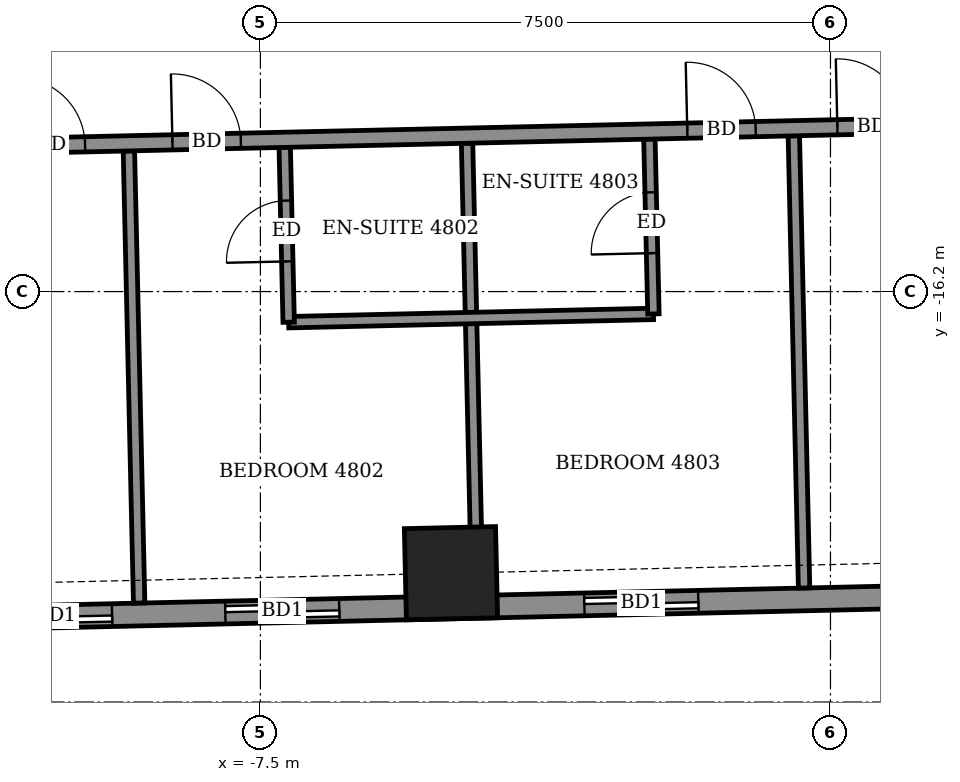
"""IFC4 building model, lengths in metres.
Left out: names, types, materials, properties, quantities, classifications, styles, units other than length and angle.
Written with IfcOpenShell. Run it as: python <this file> out.ifc"""

import sys

from ifc_helpers import new_model, si_unit, direction, frame, frame_2d, origin, origin_2d, place, context, subcontext, project, spatial, rectangle, extrude, element, fill, save


model = new_model("IFC4")
c1 = context("Model", 3, precision=1e-05, world=origin(), true_north=direction((0.0, 1.0)))
c2 = subcontext(c1, "Body", "Model", "MODEL_VIEW")
j1 = project(units=[si_unit("LENGTHUNIT", "METRE"), si_unit("PLANEANGLEUNIT", "RADIAN")], contexts=[c1])
p1 = place(None, origin())
s1 = spatial("IfcSite", under=j1, at=p1, CompositionType="ELEMENT")
p2 = place(p1, origin())
s2 = spatial("IfcBuilding", under=s1, at=p2, CompositionType="ELEMENT")
p3 = place(p2, frame((0.0, 0.0, 189.7)))
s3 = spatial("IfcBuildingStorey", under=s2, at=p3, CompositionType="ELEMENT", Elevation=189.7)
p4 = place(p3, frame((-4.993, -19.905, -0.55), z_axis=(0.0, 0.0, 1.0), x_axis=(0.999741061935, 0.022755418739, 0.0)))
e1 = element("IfcColumn", 1, at=p4, inside=s3, PredefinedType="COLUMN", context=c2, shape_type="SweptSolid", body=[
    extrude(rectangle(XDim=1.2, YDim=1.2, at=origin_2d()), origin(), (0.0, 0.0, 1.0), 3.6),
])
p5 = place(p3, frame((-18.189, -20.655, 0.0), z_axis=(0.0, 0.0, 1.0), x_axis=(0.999742285265, 0.022701609063, 0.0)))
e2 = element("IfcWall", 2, at=p5, inside=s3, PredefinedType="SOLIDWALL", context=c2, shape_type="SweptSolid", body=[
    extrude(rectangle(XDim=39.78, YDim=0.3, at=frame_2d((19.89, 0.0))), origin(), (0.0, 0.0, 1.0), 3.05),
])
p6 = place(p5, frame((1.948, 0.0, 0.0)))
e3 = element("IfcOpeningElement", 3, at=p6, cuts=e2, PredefinedType="OPENING", context=c2, shape_type="SweptSolid", body=[
    extrude(rectangle(XDim=1.5, YDim=2.4, at=frame_2d((0.75, 1.2))), frame((0.0, 0.16, 0.0), z_axis=(0.0, -1.0, 0.0), x_axis=(1.0, 0.0, 0.0)), (0.0, 0.0, 1.0), 0.32),
])
p7 = place(p5, frame((7.24, 0.0, 0.0)))
e4 = element("IfcOpeningElement", 4, at=p7, cuts=e2, PredefinedType="OPENING", context=c2, shape_type="SweptSolid", body=[
    extrude(rectangle(XDim=1.5, YDim=2.4, at=frame_2d((0.75, 1.2))), frame((0.0, 0.16, 0.0), z_axis=(0.0, -1.0, 0.0), x_axis=(1.0, 0.0, 0.0)), (0.0, 0.0, 1.0), 0.32),
])
p8 = place(p5, frame((10.23, 0.0, 0.0)))
e5 = element("IfcOpeningElement", 5, at=p8, cuts=e2, PredefinedType="OPENING", context=c2, shape_type="SweptSolid", body=[
    extrude(rectangle(XDim=1.5, YDim=2.4, at=frame_2d((0.75, 1.2))), frame((0.0, 0.16, 0.0), z_axis=(0.0, -1.0, 0.0), x_axis=(1.0, 0.0, 0.0)), (0.0, 0.0, 1.0), 0.32),
])
p9 = place(p5, frame((14.955, 0.0, 0.0)))
e6 = element("IfcOpeningElement", 6, at=p9, cuts=e2, PredefinedType="OPENING", context=c2, shape_type="SweptSolid", body=[
    extrude(rectangle(XDim=1.5, YDim=2.4, at=frame_2d((0.75, 1.2))), frame((0.0, 0.16, 0.0), z_axis=(0.0, -1.0, 0.0), x_axis=(1.0, 0.0, 0.0)), (0.0, 0.0, 1.0), 0.32),
])
p10 = place(p5, frame((20.67, 0.0, 0.0)))
e7 = element("IfcOpeningElement", 7, at=p10, cuts=e2, PredefinedType="OPENING", context=c2, shape_type="SweptSolid", body=[
    extrude(rectangle(XDim=1.2, YDim=2.4, at=frame_2d((0.6, 1.2))), frame((0.0, 0.16, 0.0), z_axis=(0.0, -1.0, 0.0), x_axis=(1.0, 0.0, 0.0)), (0.0, 0.0, 1.0), 0.32),
])
p11 = place(p5, frame((23.51, 0.0, 0.0)))
e8 = element("IfcOpeningElement", 8, at=p11, cuts=e2, PredefinedType="OPENING", context=c2, shape_type="SweptSolid", body=[
    extrude(rectangle(XDim=1.5, YDim=2.4, at=frame_2d((0.75, 1.2))), frame((0.0, 0.16, 0.0), z_axis=(0.0, -1.0, 0.0), x_axis=(1.0, 0.0, 0.0)), (0.0, 0.0, 1.0), 0.32),
])
p12 = place(p5, frame((28.21, 0.0, 0.0)))
e9 = element("IfcOpeningElement", 9, at=p12, cuts=e2, PredefinedType="OPENING", context=c2, shape_type="SweptSolid", body=[
    extrude(rectangle(XDim=1.5, YDim=2.4, at=frame_2d((0.75, 1.2))), frame((0.0, 0.16, 0.0), z_axis=(0.0, -1.0, 0.0), x_axis=(1.0, 0.0, 0.0)), (0.0, 0.0, 1.0), 0.32),
])
p13 = place(p5, frame((31.35, 0.0, 0.0)))
e10 = element("IfcOpeningElement", 10, at=p13, cuts=e2, PredefinedType="OPENING", context=c2, shape_type="SweptSolid", body=[
    extrude(rectangle(XDim=1.2, YDim=2.4, at=frame_2d((0.6, 1.2))), frame((0.0, 0.16, 0.0), z_axis=(0.0, -1.0, 0.0), x_axis=(1.0, 0.0, 0.0)), (0.0, 0.0, 1.0), 0.32),
])
p14 = place(p5, frame((35.94, 0.0, 0.9)))
e11 = element("IfcOpeningElement", 11, at=p14, cuts=e2, PredefinedType="OPENING", context=c2, shape_type="SweptSolid", body=[
    extrude(rectangle(XDim=2.4, YDim=1.5, at=frame_2d((1.2, 0.75))), frame((0.0, 0.16, 0.0), z_axis=(0.0, -1.0, 0.0), x_axis=(1.0, 0.0, 0.0)), (0.0, 0.0, 1.0), 0.32),
])
p15 = place(p3, frame((-9.095, -20.298, 0.0), z_axis=(0.0, 0.0, 1.0), x_axis=(-0.022692509051, 0.999742491861, 0.0)))
e12 = element("IfcWall", 12, at=p15, inside=s3, PredefinedType="PARTITIONING", context=c2, shape_type="SweptSolid", body=[
    extrude(rectangle(XDim=5.949, YDim=0.15, at=frame_2d((2.975, 0.0))), origin(), (0.0, 0.0, 1.0), 2.55),
])
p16 = place(p3, frame((-4.646, -20.197, 0.0), z_axis=(0.0, 0.0, 1.0), x_axis=(-0.022692509051, 0.999742491861, 0.0)))
e13 = element("IfcWall", 13, at=p16, inside=s3, PredefinedType="PARTITIONING", context=c2, shape_type="SweptSolid", body=[
    extrude(rectangle(XDim=5.949, YDim=0.15, at=frame_2d((2.975, 0.0))), origin(), (0.0, 0.0, 1.0), 3.05),
])
p17 = place(p3, frame((-0.347, -20.1, 0.0), z_axis=(0.0, 0.0, 1.0), x_axis=(-0.022687855237, 0.999742597484, 0.0)))
e14 = element("IfcWall", 14, at=p17, inside=s3, PredefinedType="PARTITIONING", context=c2, shape_type="SweptSolid", body=[
    extrude(rectangle(XDim=5.951, YDim=0.15, at=frame_2d((2.975, 0.0))), origin(), (0.0, 0.0, 1.0), 2.55),
])
p18 = place(p3, frame((-7.128, -16.603, 0.0), z_axis=(0.0, 0.0, 1.0), x_axis=(0.999741520352, 0.022735269617, 0.0)))
e15 = element("IfcWall", 15, at=p18, inside=s3, PredefinedType="PARTITIONING", context=c2, shape_type="SweptSolid", body=[
    extrude(rectangle(XDim=4.8, YDim=0.15, at=frame_2d((2.4, 0.0))), origin(), (0.0, 0.0, 1.0), 3.05),
])
p19 = place(p3, frame((-7.128, -16.603, 0.0), z_axis=(0.0, 0.0, 1.0), x_axis=(-0.022603288534, 0.999744513037, 0.0)))
e16 = element("IfcWall", 16, at=p19, inside=s3, PredefinedType="PARTITIONING", context=c2, shape_type="SweptSolid", body=[
    extrude(rectangle(XDim=2.301, YDim=0.15, at=frame_2d((1.15, 0.0))), origin(), (0.0, 0.0, 1.0), 3.05),
])
p20 = place(p19, frame((0.8, 0.0, 0.0)))
e17 = element("IfcOpeningElement", 17, at=p20, cuts=e16, PredefinedType="OPENING", context=c2, shape_type="SweptSolid", body=[
    extrude(rectangle(XDim=0.8, YDim=2.1, at=frame_2d((0.4, 1.05))), frame((0.0, 0.085, 0.0), z_axis=(0.0, -1.0, 0.0), x_axis=(1.0, 0.0, 0.0)), (0.0, 0.0, 1.0), 0.17),
])
p21 = place(p3, frame((-2.329, -16.494, 0.0), z_axis=(0.0, 0.0, 1.0), x_axis=(-0.023029983665, 0.999734774754, 0.0)))
e18 = element("IfcWall", 18, at=p21, inside=s3, PredefinedType="PARTITIONING", context=c2, shape_type="SweptSolid", body=[
    extrude(rectangle(XDim=2.3, YDim=0.15, at=frame_2d((1.15, 0.0))), origin(), (0.0, 0.0, 1.0), 3.05),
])
p22 = place(p21, frame((0.8, 0.0, 0.0)))
e19 = element("IfcOpeningElement", 19, at=p22, cuts=e18, PredefinedType="OPENING", context=c2, shape_type="SweptSolid", body=[
    extrude(rectangle(XDim=0.8, YDim=2.1, at=frame_2d((0.4, 1.05))), frame((0.0, 0.085, 0.0), z_axis=(0.0, -1.0, 0.0), x_axis=(1.0, 0.0, 0.0)), (0.0, 0.0, 1.0), 0.17),
])
p23 = place(p3, frame((-21.279, -14.523, 0.0), z_axis=(0.0, 0.0, 1.0), x_axis=(0.999742878501, 0.022675468818, 0.0)))
e20 = element("IfcWall", 20, at=p23, inside=s3, PredefinedType="PARTITIONING", context=c2, shape_type="SweptSolid", body=[
    extrude(rectangle(XDim=46.48, YDim=0.2, at=frame_2d((23.24, 0.0))), origin(), (0.0, 0.0, 1.0), 3.05),
])
p24 = place(p23, frame((1.4, 0.0, 0.0)))
e21 = element("IfcOpeningElement", 21, at=p24, cuts=e20, PredefinedType="OPENING", context=c2, shape_type="SweptSolid", body=[
    extrude(rectangle(XDim=1.0, YDim=2.1, at=frame_2d((0.5, 1.05))), frame((0.0, 0.11, 0.0), z_axis=(0.0, -1.0, 0.0), x_axis=(1.0, 0.0, 0.0)), (0.0, 0.0, 1.0), 0.22),
])
p25 = place(p23, frame((5.95, 0.0, 0.0)))
e22 = element("IfcOpeningElement", 22, at=p25, cuts=e20, PredefinedType="OPENING", context=c2, shape_type="SweptSolid", body=[
    extrude(rectangle(XDim=0.9, YDim=2.1, at=frame_2d((0.45, 1.05))), frame((0.0, 0.11, 0.0), z_axis=(0.0, -1.0, 0.0), x_axis=(1.0, 0.0, 0.0)), (0.0, 0.0, 1.0), 0.22),
])
p26 = place(p23, frame((10.575, 0.0, 0.0)))
e23 = element("IfcOpeningElement", 23, at=p26, cuts=e20, PredefinedType="OPENING", context=c2, shape_type="SweptSolid", body=[
    extrude(rectangle(XDim=0.9, YDim=2.1, at=frame_2d((0.45, 1.05))), frame((0.0, 0.11, 0.0), z_axis=(0.0, -1.0, 0.0), x_axis=(1.0, 0.0, 0.0)), (0.0, 0.0, 1.0), 0.22),
])
p27 = place(p23, frame((12.625, 0.0, 0.0)))
e24 = element("IfcOpeningElement", 24, at=p27, cuts=e20, PredefinedType="OPENING", context=c2, shape_type="SweptSolid", body=[
    extrude(rectangle(XDim=0.9, YDim=2.1, at=frame_2d((0.45, 1.05))), frame((0.0, 0.11, 0.0), z_axis=(0.0, -1.0, 0.0), x_axis=(1.0, 0.0, 0.0)), (0.0, 0.0, 1.0), 0.22),
])
p28 = place(p23, frame((19.4, 0.0, 0.0)))
e25 = element("IfcOpeningElement", 25, at=p28, cuts=e20, PredefinedType="OPENING", context=c2, shape_type="SweptSolid", body=[
    extrude(rectangle(XDim=0.9, YDim=2.1, at=frame_2d((0.45, 1.05))), frame((0.0, 0.11, 0.0), z_axis=(0.0, -1.0, 0.0), x_axis=(1.0, 0.0, 0.0)), (0.0, 0.0, 1.0), 0.22),
])
p29 = place(p23, frame((21.375, 0.0, 0.0)))
e26 = element("IfcOpeningElement", 26, at=p29, cuts=e20, PredefinedType="OPENING", context=c2, shape_type="SweptSolid", body=[
    extrude(rectangle(XDim=0.9, YDim=2.1, at=frame_2d((0.45, 1.05))), frame((0.0, 0.11, 0.0), z_axis=(0.0, -1.0, 0.0), x_axis=(1.0, 0.0, 0.0)), (0.0, 0.0, 1.0), 0.22),
])
p30 = place(p23, frame((28.15, 0.0, 0.0)))
e27 = element("IfcOpeningElement", 27, at=p30, cuts=e20, PredefinedType="OPENING", context=c2, shape_type="SweptSolid", body=[
    extrude(rectangle(XDim=0.9, YDim=2.1, at=frame_2d((0.45, 1.05))), frame((0.0, 0.11, 0.0), z_axis=(0.0, -1.0, 0.0), x_axis=(1.0, 0.0, 0.0)), (0.0, 0.0, 1.0), 0.22),
])
p31 = place(p23, frame((30.1, 0.0, 0.0)))
e28 = element("IfcOpeningElement", 28, at=p31, cuts=e20, PredefinedType="OPENING", context=c2, shape_type="SweptSolid", body=[
    extrude(rectangle(XDim=0.9, YDim=2.1, at=frame_2d((0.45, 1.05))), frame((0.0, 0.11, 0.0), z_axis=(0.0, -1.0, 0.0), x_axis=(1.0, 0.0, 0.0)), (0.0, 0.0, 1.0), 0.22),
])
p32 = place(p23, frame((36.875, 0.0, 0.0)))
e29 = element("IfcOpeningElement", 29, at=p32, cuts=e20, PredefinedType="OPENING", context=c2, shape_type="SweptSolid", body=[
    extrude(rectangle(XDim=0.9, YDim=2.1, at=frame_2d((0.45, 1.05))), frame((0.0, 0.11, 0.0), z_axis=(0.0, -1.0, 0.0), x_axis=(1.0, 0.0, 0.0)), (0.0, 0.0, 1.0), 0.22),
])
p33 = place(p23, frame((43.89, 0.0, 0.0)))
e30 = element("IfcOpeningElement", 30, at=p33, cuts=e20, PredefinedType="OPENING", context=c2, shape_type="SweptSolid", body=[
    extrude(rectangle(XDim=1.0, YDim=2.1, at=frame_2d((0.5, 1.05))), frame((0.0, 0.11, 0.0), z_axis=(0.0, -1.0, 0.0), x_axis=(1.0, 0.0, 0.0)), (0.0, 0.0, 1.0), 0.22),
])
p34 = place(p23, frame((39.05, 0.0, 0.0)))
e31 = element("IfcOpeningElement", 31, at=p34, cuts=e20, PredefinedType="OPENING", context=c2, shape_type="SweptSolid", body=[
    extrude(rectangle(XDim=0.9, YDim=2.1, at=frame_2d((0.45, 1.05))), frame((0.0, 0.11, 0.0), z_axis=(0.0, -1.0, 0.0), x_axis=(1.0, 0.0, 0.0)), (0.0, 0.0, 1.0), 0.22),
])
p35 = place(p7, origin())
e32 = element("IfcDoor", 32, at=p35, inside=s3, OperationType="SLIDING_TO_LEFT", PredefinedType="DOOR", context=c2, shape_type="SweptSolid", body=[
    extrude(rectangle(XDim=1.5, YDim=2.4, at=frame_2d((0.75, 1.2))), frame((0.0, 0.025, 0.0), z_axis=(0.0, -1.0, 0.0), x_axis=(1.0, 0.0, 0.0)), (0.0, 0.0, 1.0), 0.05),
])
fill(e4, e32)
p36 = place(p8, origin())
e33 = element("IfcDoor", 33, at=p36, inside=s3, OperationType="SLIDING_TO_LEFT", PredefinedType="DOOR", context=c2, shape_type="SweptSolid", body=[
    extrude(rectangle(XDim=1.5, YDim=2.4, at=frame_2d((0.75, 1.2))), frame((0.0, 0.025, 0.0), z_axis=(0.0, -1.0, 0.0), x_axis=(1.0, 0.0, 0.0)), (0.0, 0.0, 1.0), 0.05),
])
fill(e5, e33)
p37 = place(p9, origin())
e34 = element("IfcDoor", 34, at=p37, inside=s3, OperationType="SLIDING_TO_LEFT", PredefinedType="DOOR", context=c2, shape_type="SweptSolid", body=[
    extrude(rectangle(XDim=1.5, YDim=2.4, at=frame_2d((0.75, 1.2))), frame((0.0, 0.025, 0.0), z_axis=(0.0, -1.0, 0.0), x_axis=(1.0, 0.0, 0.0)), (0.0, 0.0, 1.0), 0.05),
])
fill(e6, e34)
p38 = place(p26, origin())
e35 = element("IfcDoor", 35, at=p38, inside=s3, OperationType="SINGLE_SWING_LEFT", PredefinedType="DOOR", context=c2, shape_type="SweptSolid", body=[
    extrude(rectangle(XDim=0.9, YDim=2.1, at=frame_2d((0.45, 1.05))), frame((0.0, 0.025, 0.0), z_axis=(0.0, -1.0, 0.0), x_axis=(1.0, 0.0, 0.0)), (0.0, 0.0, 1.0), 0.05),
])
fill(e23, e35)
p39 = place(p27, origin())
e36 = element("IfcDoor", 36, at=p39, inside=s3, OperationType="SINGLE_SWING_RIGHT", PredefinedType="DOOR", context=c2, shape_type="SweptSolid", body=[
    extrude(rectangle(XDim=0.9, YDim=2.1, at=frame_2d((0.45, 1.05))), frame((0.0, 0.025, 0.0), z_axis=(0.0, -1.0, 0.0), x_axis=(1.0, 0.0, 0.0)), (0.0, 0.0, 1.0), 0.05),
])
fill(e24, e36)
p40 = place(p20, origin())
e37 = element("IfcDoor", 37, at=p40, inside=s3, OperationType="SINGLE_SWING_RIGHT", PredefinedType="DOOR", context=c2, shape_type="SweptSolid", body=[
    extrude(rectangle(XDim=0.8, YDim=2.1, at=frame_2d((0.4, 1.05))), frame((0.0, 0.025, 0.0), z_axis=(0.0, -1.0, 0.0), x_axis=(1.0, 0.0, 0.0)), (0.0, 0.0, 1.0), 0.05),
])
fill(e17, e37)
p41 = place(p28, origin())
e38 = element("IfcDoor", 38, at=p41, inside=s3, OperationType="SINGLE_SWING_LEFT", PredefinedType="DOOR", context=c2, shape_type="SweptSolid", body=[
    extrude(rectangle(XDim=0.9, YDim=2.1, at=frame_2d((0.45, 1.05))), frame((0.0, 0.025, 0.0), z_axis=(0.0, -1.0, 0.0), x_axis=(1.0, 0.0, 0.0)), (0.0, 0.0, 1.0), 0.05),
])
fill(e25, e38)
p42 = place(p22, origin())
e39 = element("IfcDoor", 39, at=p42, inside=s3, OperationType="SINGLE_SWING_LEFT", PredefinedType="DOOR", context=c2, shape_type="SweptSolid", body=[
    extrude(rectangle(XDim=0.8, YDim=2.1, at=frame_2d((0.4, 1.05))), frame((0.0, 0.025, 0.0), z_axis=(0.0, -1.0, 0.0), x_axis=(1.0, 0.0, 0.0)), (0.0, 0.0, 1.0), 0.05),
])
fill(e19, e39)
p43 = place(p29, origin())
e40 = element("IfcDoor", 40, at=p43, inside=s3, OperationType="SINGLE_SWING_RIGHT", PredefinedType="DOOR", context=c2, shape_type="SweptSolid", body=[
    extrude(rectangle(XDim=0.9, YDim=2.1, at=frame_2d((0.45, 1.05))), frame((0.0, 0.025, 0.0), z_axis=(0.0, -1.0, 0.0), x_axis=(1.0, 0.0, 0.0)), (0.0, 0.0, 1.0), 0.05),
])
fill(e26, e40)
save(model, sys.argv[1])
